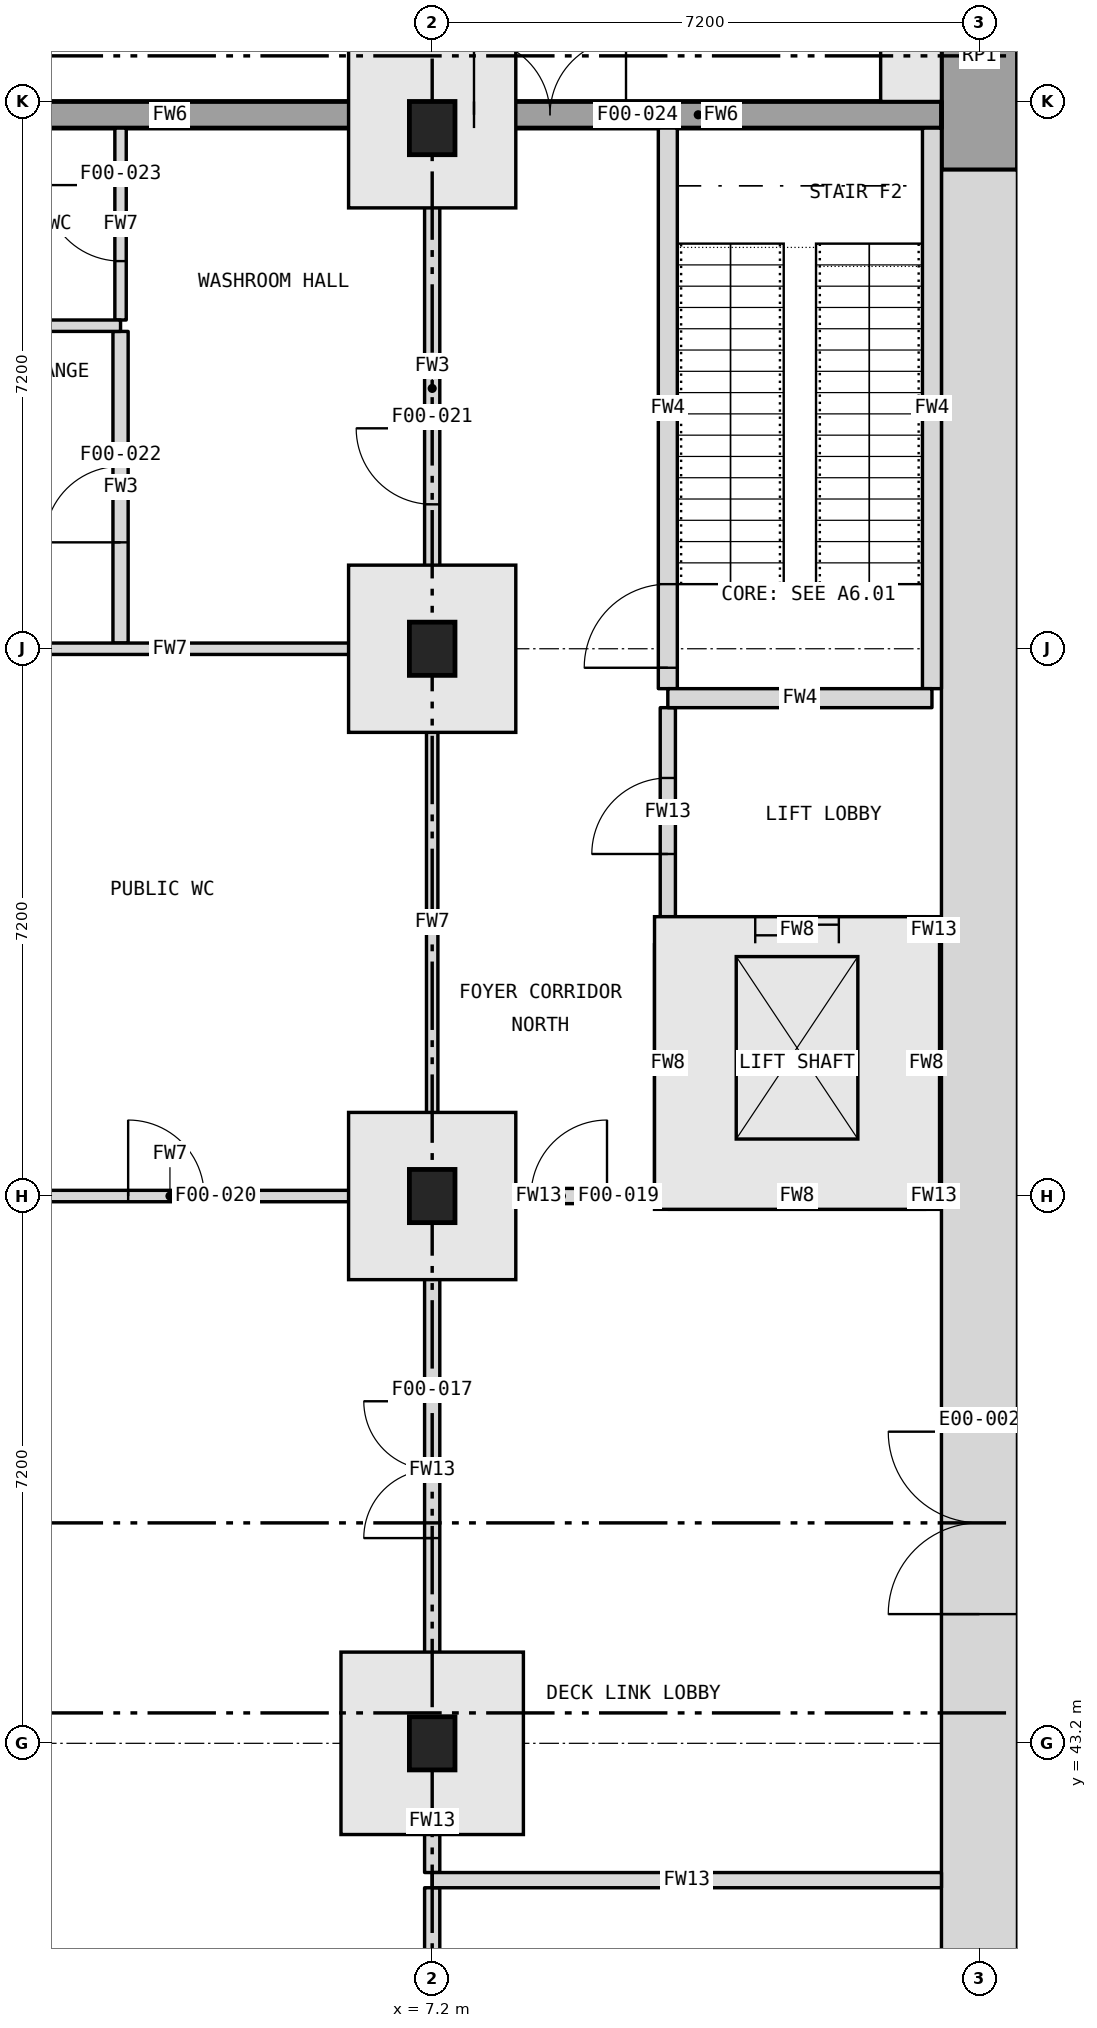
"""IFC4 building model, lengths in metres.
Left out: names, types, materials, properties, quantities, classifications, styles, units other than length and angle.
Written with IfcOpenShell. Run it as: python <this file> out.ifc"""

import sys

from ifc_helpers import new_model, si_unit, direction, frame, frame_2d, origin, origin_2d, place, context, subcontext, project, spatial, rectangle, extrude, element, fill, save


model = new_model("IFC4")
c1 = context("Model", 3, precision=1e-05, world=origin(), true_north=direction((0.0, 1.0)))
c2 = subcontext(c1, "Body", "Model", "MODEL_VIEW")
j1 = project(units=[si_unit("LENGTHUNIT", "METRE"), si_unit("PLANEANGLEUNIT", "RADIAN")], contexts=[c1])
p1 = place(None, origin())
s1 = spatial("IfcSite", under=j1, at=p1, CompositionType="ELEMENT")
p2 = place(p1, origin())
s2 = spatial("IfcBuilding", under=s1, at=p2, CompositionType="ELEMENT")
p3 = place(p2, origin())
s3 = spatial("IfcBuildingStorey", under=s2, at=p3, CompositionType="ELEMENT", Elevation=0.0)
p4 = place(p3, frame((13.6, 64.7, 0.0), z_axis=(0.0, 0.0, 1.0), x_axis=(0.0, 1.0, 0.0)))
e1 = element("IfcWall", 1, at=p4, inside=s3, PredefinedType="SOLIDWALL", context=c2, shape_type="SweptSolid", body=[
    extrude(rectangle(XDim=7.3, YDim=0.6, at=frame_2d((3.65, 0.0))), origin(), (0.0, 0.0, 1.0), 6.0),
])
p5 = place(p4, frame((4.6, 0.0, 0.0)))
e2 = element("IfcOpeningElement", 2, at=p5, cuts=e1, PredefinedType="OPENING", context=c2, shape_type="SweptSolid", body=[
    extrude(rectangle(XDim=1.8, YDim=2.4, at=frame_2d((0.9, 1.2))), frame((0.0, 0.31, 0.0), z_axis=(0.0, -1.0, 0.0), x_axis=(1.0, 0.0, 0.0)), (0.0, 0.0, 1.0), 0.62),
])
p6 = place(p3, frame((14.4, 63.9, 0.0), z_axis=(0.0, 0.0, 1.0), x_axis=(0.0, 1.0, 0.0)))
e3 = element("IfcWall", 3, at=p6, inside=s3, PredefinedType="SOLIDWALL", context=c2, shape_type="SweptSolid", body=[
    extrude(rectangle(XDim=3.0, YDim=1.0, at=frame_2d((1.5, 0.0))), origin(), (0.0, 0.0, 1.0), 6.0),
])
p7 = place(p3, frame((14.4, 14.0, 0.0), z_axis=(0.0, 0.0, 1.0), x_axis=(0.0, 1.0, 0.0)))
e4 = element("IfcWall", 4, at=p7, inside=s3, PredefinedType="SOLIDWALL", context=c2, shape_type="SweptSolid", body=[
    extrude(rectangle(XDim=49.9, YDim=1.0, at=frame_2d((24.95, 0.0))), origin(), (0.0, 0.0, 1.0), 6.0),
])
p8 = place(p7, frame((30.9, 0.0, 0.0)))
e5 = element("IfcOpeningElement", 5, at=p8, cuts=e4, PredefinedType="OPENING", context=c2, shape_type="SweptSolid", body=[
    extrude(rectangle(XDim=2.4, YDim=2.7, at=frame_2d((1.2, 1.35))), frame((0.0, 0.51, 0.0), z_axis=(0.0, -1.0, 0.0), x_axis=(1.0, 0.0, 0.0)), (0.0, 0.0, 1.0), 1.02),
])
for number, where, z_axis, x_axis in (
    (6, (7.2, 43.2, -0.405), (0.0, 0.0, 1.0), (1.0, 0.0, 0.0)),
    (7, (7.2, 50.4, -0.405), (0.0, 0.0, 1.0), (1.0, 0.0, 0.0)),
    (8, (7.2, 57.6, -0.405), (0.0, 0.0, 1.0), (1.0, 0.0, 0.0)),
):
    element("IfcColumn", number, at=place(p3, frame(where, z_axis=z_axis, x_axis=x_axis)), inside=s3, PredefinedType="COLUMN", context=c2, shape_type="SweptSolid", body=[
        extrude(rectangle(XDim=0.6, YDim=0.7, at=origin_2d()), origin(), (0.0, 0.0, 1.0), 6.405),
    ])
p9 = place(p3, frame((7.2, 64.45, -0.45), z_axis=(0.0, 0.0, 1.0), x_axis=(1.0, 0.0, 0.0)))
e9 = element("IfcColumn", 9, at=p9, inside=s3, PredefinedType="COLUMN", context=c2, shape_type="SweptSolid", body=[
    extrude(rectangle(XDim=0.6, YDim=0.7, at=origin_2d()), origin(), (0.0, 0.0, 1.0), 6.45),
])
p10 = place(p3, frame((0.6, 64.625, 0.0), z_axis=(0.0, 0.0, 1.0), x_axis=(1.0, 0.0, 0.0)))
e10 = element("IfcWall", 10, at=p10, inside=s3, PredefinedType="SOLIDWALL", context=c2, shape_type="SweptSolid", body=[
    extrude(rectangle(XDim=6.3, YDim=0.35, at=frame_2d((3.15, 0.0))), origin(), (0.0, 0.0, 1.0), 5.675),
])
p11 = place(p3, frame((7.5, 64.625, 0.0), z_axis=(0.0, 0.0, 1.0), x_axis=(1.0, 0.0, 0.0)))
e11 = element("IfcWall", 11, at=p11, inside=s3, PredefinedType="SOLIDWALL", context=c2, shape_type="SweptSolid", body=[
    extrude(rectangle(XDim=6.4, YDim=0.35, at=frame_2d((3.2, 0.0))), origin(), (0.0, 0.0, 1.0), 5.675),
])
p12 = place(p11, frame((0.25, 0.0, 0.0)))
e12 = element("IfcOpeningElement", 12, at=p12, cuts=e11, PredefinedType="OPENING", context=c2, shape_type="SweptSolid", body=[
    extrude(rectangle(XDim=2.0, YDim=2.4, at=frame_2d((1.0, 1.2))), frame((0.0, 0.185, 0.0), z_axis=(0.0, -1.0, 0.0), x_axis=(1.0, 0.0, 0.0)), (0.0, 0.0, 1.0), 0.37),
])
p13 = place(p3, frame((3.1, 61.925, 0.0), z_axis=(0.0, 0.0, 1.0), x_axis=(0.0, 1.0, 0.0)))
e13 = element("IfcWall", 13, at=p13, inside=s3, PredefinedType="PARTITIONING", context=c2, shape_type="SweptSolid", body=[
    extrude(rectangle(XDim=2.525, YDim=0.15, at=frame_2d((1.262, 0.0))), origin(), (0.0, 0.0, 1.0), 5.675),
])
p14 = place(p13, frame((0.775, 0.0, 0.0)))
e14 = element("IfcOpeningElement", 14, at=p14, cuts=e13, PredefinedType="OPENING", context=c2, shape_type="SweptSolid", body=[
    extrude(rectangle(XDim=1.0, YDim=2.1, at=frame_2d((0.5, 1.05))), frame((0.0, 0.085, 0.0), z_axis=(0.0, -1.0, 0.0), x_axis=(1.0, 0.0, 0.0)), (0.0, 0.0, 1.0), 0.17),
])
p15 = place(p3, frame((3.1, 57.675, 0.0), z_axis=(0.0, 0.0, 1.0), x_axis=(0.0, 1.0, 0.0)))
e15 = element("IfcWall", 15, at=p15, inside=s3, PredefinedType="PARTITIONING", context=c2, shape_type="SweptSolid", body=[
    extrude(rectangle(XDim=4.1, YDim=0.2, at=frame_2d((2.05, 0.0))), origin(), (0.0, 0.0, 1.0), 5.675),
])
p16 = place(p15, frame((1.325, 0.0, 0.0)))
e16 = element("IfcOpeningElement", 16, at=p16, cuts=e15, PredefinedType="OPENING", context=c2, shape_type="SweptSolid", body=[
    extrude(rectangle(XDim=1.0, YDim=2.1, at=frame_2d((0.5, 1.05))), frame((0.0, 0.11, 0.0), z_axis=(0.0, -1.0, 0.0), x_axis=(1.0, 0.0, 0.0)), (0.0, 0.0, 1.0), 0.22),
])
p17 = place(p3, frame((7.2, 41.5, 0.0), z_axis=(0.0, 0.0, 1.0), x_axis=(0.0, 1.0, 0.0)))
e17 = element("IfcWall", 17, at=p17, inside=s3, PredefinedType="PARTITIONING", context=c2, shape_type="SweptSolid", body=[
    extrude(rectangle(XDim=1.35, YDim=0.2, at=frame_2d((0.675, 0.0))), origin(), (0.0, 0.0, 1.0), 5.675),
])
p18 = place(p3, frame((7.2, 43.55, 0.0), z_axis=(0.0, 0.0, 1.0), x_axis=(0.0, 1.0, 0.0)))
e18 = element("IfcWall", 18, at=p18, inside=s3, PredefinedType="PARTITIONING", context=c2, shape_type="SweptSolid", body=[
    extrude(rectangle(XDim=6.5, YDim=0.2, at=frame_2d((3.25, 0.0))), origin(), (0.0, 0.0, 1.0), 5.675),
])
p19 = place(p18, frame((2.35, 0.0, 0.0)))
e19 = element("IfcOpeningElement", 19, at=p19, cuts=e18, PredefinedType="OPENING", context=c2, shape_type="SweptSolid", body=[
    extrude(rectangle(XDim=1.8, YDim=2.1, at=frame_2d((0.9, 1.05))), frame((0.0, 0.11, 0.0), z_axis=(0.0, -1.0, 0.0), x_axis=(1.0, 0.0, 0.0)), (0.0, 0.0, 1.0), 0.22),
])
p20 = place(p3, frame((7.2, 50.75, 0.0), z_axis=(0.0, 0.0, 1.0), x_axis=(0.0, 1.0, 0.0)))
e20 = element("IfcWall", 20, at=p20, inside=s3, PredefinedType="PARTITIONING", context=c2, shape_type="SweptSolid", body=[
    extrude(rectangle(XDim=6.5, YDim=0.15, at=frame_2d((3.25, 0.0))), origin(), (0.0, 0.0, 1.0), 5.675),
])
p21 = place(p3, frame((7.2, 36.35, 0.0), z_axis=(0.0, 0.0, 1.0), x_axis=(0.0, 1.0, 0.0)))
e21 = element("IfcWall", 21, at=p21, inside=s3, PredefinedType="PARTITIONING", context=c2, shape_type="SweptSolid", body=[
    extrude(rectangle(XDim=4.95, YDim=0.2, at=frame_2d((2.475, 0.0))), origin(), (0.0, 0.0, 1.0), 5.675),
])
p22 = place(p21, frame((1.55, 0.0, 0.0)))
e22 = element("IfcOpeningElement", 22, at=p22, cuts=e21, PredefinedType="OPENING", context=c2, shape_type="SweptSolid", body=[
    extrude(rectangle(XDim=1.8, YDim=2.1, at=frame_2d((0.9, 1.05))), frame((0.0, 0.11, 0.0), z_axis=(0.0, -1.0, 0.0), x_axis=(1.0, 0.0, 0.0)), (0.0, 0.0, 1.0), 0.22),
])
p23 = place(p3, frame((7.2, 57.95, 0.0), z_axis=(0.0, 0.0, 1.0), x_axis=(0.0, 1.0, 0.0)))
e23 = element("IfcWall", 23, at=p23, inside=s3, PredefinedType="PARTITIONING", context=c2, shape_type="SweptSolid", body=[
    extrude(rectangle(XDim=6.15, YDim=0.2, at=frame_2d((3.075, 0.0))), origin(), (0.0, 0.0, 1.0), 5.675),
])
p24 = place(p23, frame((1.55, 0.0, 0.0)))
e24 = element("IfcOpeningElement", 24, at=p24, cuts=e23, PredefinedType="OPENING", context=c2, shape_type="SweptSolid", body=[
    extrude(rectangle(XDim=1.0, YDim=2.1, at=frame_2d((0.5, 1.05))), frame((0.0, 0.11, 0.0), z_axis=(0.0, -1.0, 0.0), x_axis=(1.0, 0.0, 0.0)), (0.0, 0.0, 1.0), 0.22),
])
p25 = place(p3, frame((10.3, 57.075, 0.0), z_axis=(0.0, 0.0, 1.0), x_axis=(0.0, 1.0, 0.0)))
e25 = element("IfcWall", 25, at=p25, inside=s3, PredefinedType="SOLIDWALL", context=c2, shape_type="SweptSolid", body=[
    extrude(rectangle(XDim=7.375, YDim=0.25, at=frame_2d((3.688, 0.0))), origin(), (0.0, 0.0, 1.0), 5.675),
])
p26 = place(p25, frame((0.275, 0.0, 0.0)))
e26 = element("IfcOpeningElement", 26, at=p26, cuts=e25, PredefinedType="OPENING", context=c2, shape_type="SweptSolid", body=[
    extrude(rectangle(XDim=1.1, YDim=2.1, at=frame_2d((0.55, 1.05))), frame((0.0, 0.135, 0.0), z_axis=(0.0, -1.0, 0.0), x_axis=(1.0, 0.0, 0.0)), (0.0, 0.0, 1.0), 0.27),
])
p27 = place(p3, frame((10.3, 50.575, -1.2), z_axis=(0.0, 0.0, 1.0), x_axis=(0.0, 1.0, 0.0)))
e27 = element("IfcWall", 27, at=p27, inside=s3, PredefinedType="SOLIDWALL", context=c2, shape_type="SweptSolid", body=[
    extrude(rectangle(XDim=3.15, YDim=0.35, at=frame_2d((1.575, 0.0))), origin(), (0.0, 0.0, 1.0), 6.875),
])
p28 = place(p3, frame((10.3, 54.075, 0.0), z_axis=(0.0, 0.0, 1.0), x_axis=(0.0, 1.0, 0.0)))
e28 = element("IfcWall", 28, at=p28, inside=s3, PredefinedType="PARTITIONING", context=c2, shape_type="SweptSolid", body=[
    extrude(rectangle(XDim=2.75, YDim=0.2, at=frame_2d((1.375, 0.0))), origin(), (0.0, 0.0, 1.0), 5.675),
])
p29 = place(p28, frame((0.825, 0.0, 0.0)))
e29 = element("IfcOpeningElement", 29, at=p29, cuts=e28, PredefinedType="OPENING", context=c2, shape_type="SweptSolid", body=[
    extrude(rectangle(XDim=1.0, YDim=2.1, at=frame_2d((0.5, 1.05))), frame((0.0, 0.11, 0.0), z_axis=(0.0, -1.0, 0.0), x_axis=(1.0, 0.0, 0.0)), (0.0, 0.0, 1.0), 0.22),
])
p30 = place(p3, frame((13.7, 50.575, -1.2), z_axis=(0.0, 0.0, 1.0), x_axis=(0.0, 1.0, 0.0)))
e30 = element("IfcWall", 30, at=p30, inside=s3, PredefinedType="SOLIDWALL", context=c2, shape_type="SweptSolid", body=[
    extrude(rectangle(XDim=3.15, YDim=0.35, at=frame_2d((1.575, 0.0))), origin(), (0.0, 0.0, 1.0), 6.875),
])
p31 = place(p3, frame((13.775, 57.075, 0.0), z_axis=(0.0, 0.0, 1.0), x_axis=(0.0, 1.0, 0.0)))
e31 = element("IfcWall", 31, at=p31, inside=s3, PredefinedType="SOLIDWALL", context=c2, shape_type="SweptSolid", body=[
    extrude(rectangle(XDim=7.375, YDim=0.25, at=frame_2d((3.688, 0.0))), origin(), (0.0, 0.0, 1.0), 5.675),
])
p32 = place(p3, frame((7.2, 41.4, 0.0), z_axis=(0.0, 0.0, 1.0), x_axis=(1.0, 0.0, 0.0)))
e32 = element("IfcWall", 32, at=p32, inside=s3, PredefinedType="PARTITIONING", context=c2, shape_type="SweptSolid", body=[
    extrude(rectangle(XDim=6.7, YDim=0.2, at=frame_2d((3.35, 0.0))), origin(), (0.0, 0.0, 1.0), 5.675),
])
p33 = place(p3, frame((10.3, 50.4, -1.2), z_axis=(0.0, 0.0, 1.0), x_axis=(1.0, 0.0, 0.0)))
e33 = element("IfcWall", 33, at=p33, inside=s3, PredefinedType="SOLIDWALL", context=c2, shape_type="SweptSolid", body=[
    extrude(rectangle(XDim=3.4, YDim=0.35, at=frame_2d((1.7, 0.0))), origin(), (0.0, 0.0, 1.0), 6.875),
])
p34 = place(p3, frame((7.5, 50.4, 0.0), z_axis=(0.0, 0.0, 1.0), x_axis=(1.0, 0.0, 0.0)))
e34 = element("IfcWall", 34, at=p34, inside=s3, PredefinedType="PARTITIONING", context=c2, shape_type="SweptSolid", body=[
    extrude(rectangle(XDim=2.8, YDim=0.2, at=frame_2d((1.4, 0.0))), origin(), (0.0, 0.0, 1.0), 5.675),
])
p35 = place(p34, frame((1.0, 0.0, 0.0)))
e35 = element("IfcOpeningElement", 35, at=p35, cuts=e34, PredefinedType="OPENING", context=c2, shape_type="SweptSolid", body=[
    extrude(rectangle(XDim=1.0, YDim=2.1, at=frame_2d((0.5, 1.05))), frame((0.0, 0.11, 0.0), z_axis=(0.0, -1.0, 0.0), x_axis=(1.0, 0.0, 0.0)), (0.0, 0.0, 1.0), 0.22),
])
p36 = place(p3, frame((13.7, 50.4, 0.0), z_axis=(0.0, 0.0, 1.0), x_axis=(1.0, 0.0, 0.0)))
e36 = element("IfcWall", 36, at=p36, inside=s3, PredefinedType="PARTITIONING", context=c2, shape_type="SweptSolid", body=[
    extrude(rectangle(XDim=0.2, YDim=0.2, at=frame_2d((0.1, 0.0))), origin(), (0.0, 0.0, 1.0), 5.675),
])
p37 = place(p3, frame((0.6, 50.4, 0.0), z_axis=(0.0, 0.0, 1.0), x_axis=(1.0, 0.0, 0.0)))
e37 = element("IfcWall", 37, at=p37, inside=s3, PredefinedType="PARTITIONING", context=c2, shape_type="SweptSolid", body=[
    extrude(rectangle(XDim=6.3, YDim=0.15, at=frame_2d((3.15, 0.0))), origin(), (0.0, 0.0, 1.0), 5.675),
])
p38 = place(p37, frame((2.6, 0.0, 0.0)))
e38 = element("IfcOpeningElement", 38, at=p38, cuts=e37, PredefinedType="OPENING", context=c2, shape_type="SweptSolid", body=[
    extrude(rectangle(XDim=1.0, YDim=2.1, at=frame_2d((0.5, 1.05))), frame((0.0, 0.085, 0.0), z_axis=(0.0, -1.0, 0.0), x_axis=(1.0, 0.0, 0.0)), (0.0, 0.0, 1.0), 0.17),
])
p39 = place(p3, frame((10.3, 53.9, -1.2), z_axis=(0.0, 0.0, 1.0), x_axis=(1.0, 0.0, 0.0)))
e39 = element("IfcWall", 39, at=p39, inside=s3, PredefinedType="SOLIDWALL", context=c2, shape_type="SweptSolid", body=[
    extrude(rectangle(XDim=3.4, YDim=0.35, at=frame_2d((1.7, 0.0))), origin(), (0.0, 0.0, 1.0), 6.875),
])
p40 = place(p39, frame((1.15, 0.0, 1.2)))
e40 = element("IfcOpeningElement", 40, at=p40, cuts=e39, PredefinedType="OPENING", context=c2, shape_type="SweptSolid", body=[
    extrude(rectangle(XDim=1.1, YDim=2.1, at=frame_2d((0.55, 1.05))), frame((0.0, 0.185, 0.0), z_axis=(0.0, -1.0, 0.0), x_axis=(1.0, 0.0, 0.0)), (0.0, 0.0, 1.0), 0.37),
])
p41 = place(p3, frame((13.7, 53.9, 0.0), z_axis=(0.0, 0.0, 1.0), x_axis=(1.0, 0.0, 0.0)))
e41 = element("IfcWall", 41, at=p41, inside=s3, PredefinedType="PARTITIONING", context=c2, shape_type="SweptSolid", body=[
    extrude(rectangle(XDim=0.2, YDim=0.2, at=frame_2d((0.1, 0.0))), origin(), (0.0, 0.0, 1.0), 5.675),
])
p42 = place(p3, frame((10.3, 56.95, 0.0), z_axis=(0.0, 0.0, 1.0), x_axis=(1.0, 0.0, 0.0)))
e42 = element("IfcWall", 42, at=p42, inside=s3, PredefinedType="SOLIDWALL", context=c2, shape_type="SweptSolid", body=[
    extrude(rectangle(XDim=3.475, YDim=0.25, at=frame_2d((1.737, 0.0))), origin(), (0.0, 0.0, 1.0), 5.675),
])
p43 = place(p3, frame((0.6, 57.6, 0.0), z_axis=(0.0, 0.0, 1.0), x_axis=(1.0, 0.0, 0.0)))
e43 = element("IfcWall", 43, at=p43, inside=s3, PredefinedType="PARTITIONING", context=c2, shape_type="SweptSolid", body=[
    extrude(rectangle(XDim=6.3, YDim=0.15, at=frame_2d((3.15, 0.0))), origin(), (0.0, 0.0, 1.0), 5.675),
])
p44 = place(p3, frame((0.5, 61.85, 0.0), z_axis=(0.0, 0.0, 1.0), x_axis=(1.0, 0.0, 0.0)))
e44 = element("IfcWall", 44, at=p44, inside=s3, PredefinedType="PARTITIONING", context=c2, shape_type="SweptSolid", body=[
    extrude(rectangle(XDim=2.6, YDim=0.15, at=frame_2d((1.3, 0.0))), origin(), (0.0, 0.0, 1.0), 5.675),
])
p45 = place(p8, origin())
e45 = element("IfcDoor", 45, at=p45, inside=s3, OperationType="DOUBLE_DOOR_SINGLE_SWING", PredefinedType="DOOR", context=c2, shape_type="SweptSolid", body=[
    extrude(rectangle(XDim=2.4, YDim=2.7, at=frame_2d((1.2, 1.35))), frame((0.0, 0.025, 0.0), z_axis=(0.0, -1.0, 0.0), x_axis=(1.0, 0.0, 0.0)), (0.0, 0.0, 1.0), 0.05),
])
fill(e5, e45)
p46 = place(p26, origin())
e46 = element("IfcDoor", 46, at=p46, inside=s3, OperationType="SINGLE_SWING_LEFT", PredefinedType="DOOR", context=c2, shape_type="SweptSolid", body=[
    extrude(rectangle(XDim=1.1, YDim=2.1, at=frame_2d((0.55, 1.05))), frame((0.0, 0.025, 0.0), z_axis=(0.0, -1.0, 0.0), x_axis=(1.0, 0.0, 0.0)), (0.0, 0.0, 1.0), 0.05),
])
fill(e26, e46)
p47 = place(p29, origin())
e47 = element("IfcDoor", 47, at=p47, inside=s3, OperationType="SINGLE_SWING_LEFT", PredefinedType="DOOR", context=c2, shape_type="SweptSolid", body=[
    extrude(rectangle(XDim=1.0, YDim=2.1, at=frame_2d((0.5, 1.05))), frame((0.0, 0.025, 0.0), z_axis=(0.0, -1.0, 0.0), x_axis=(1.0, 0.0, 0.0)), (0.0, 0.0, 1.0), 0.05),
])
fill(e29, e47)
p48 = place(p40, origin())
e48 = element("IfcDoor", 48, at=p48, inside=s3, OperationType="DOUBLE_DOOR_SLIDING", PredefinedType="DOOR", context=c2, shape_type="SweptSolid", body=[
    extrude(rectangle(XDim=1.1, YDim=2.1, at=frame_2d((0.55, 1.05))), frame((0.0, 0.025, 0.0), z_axis=(0.0, -1.0, 0.0), x_axis=(1.0, 0.0, 0.0)), (0.0, 0.0, 1.0), 0.05),
])
fill(e40, e48)
p49 = place(p19, origin())
e49 = element("IfcDoor", 49, at=p49, inside=s3, OperationType="DOUBLE_DOOR_SINGLE_SWING", PredefinedType="DOOR", context=c2, shape_type="SweptSolid", body=[
    extrude(rectangle(XDim=1.8, YDim=2.1, at=frame_2d((0.9, 1.05))), frame((0.0, 0.025, 0.0), z_axis=(0.0, -1.0, 0.0), x_axis=(1.0, 0.0, 0.0)), (0.0, 0.0, 1.0), 0.05),
])
fill(e19, e49)
p50 = place(p35, origin())
e50 = element("IfcDoor", 50, at=p50, inside=s3, OperationType="SINGLE_SWING_RIGHT", PredefinedType="DOOR", context=c2, shape_type="SweptSolid", body=[
    extrude(rectangle(XDim=1.0, YDim=2.1, at=frame_2d((0.5, 1.05))), frame((0.0, 0.025, 0.0), z_axis=(0.0, -1.0, 0.0), x_axis=(1.0, 0.0, 0.0)), (0.0, 0.0, 1.0), 0.05),
])
fill(e35, e50)
p51 = place(p38, origin())
e51 = element("IfcDoor", 51, at=p51, inside=s3, OperationType="SINGLE_SWING_LEFT", PredefinedType="DOOR", context=c2, shape_type="SweptSolid", body=[
    extrude(rectangle(XDim=1.0, YDim=2.1, at=frame_2d((0.5, 1.05))), frame((0.0, 0.025, 0.0), z_axis=(0.0, -1.0, 0.0), x_axis=(1.0, 0.0, 0.0)), (0.0, 0.0, 1.0), 0.05),
])
fill(e38, e51)
p52 = place(p24, origin())
e52 = element("IfcDoor", 52, at=p52, inside=s3, OperationType="SINGLE_SWING_RIGHT", PredefinedType="DOOR", context=c2, shape_type="SweptSolid", body=[
    extrude(rectangle(XDim=1.0, YDim=2.1, at=frame_2d((0.5, 1.05))), frame((0.0, 0.025, 0.0), z_axis=(0.0, -1.0, 0.0), x_axis=(1.0, 0.0, 0.0)), (0.0, 0.0, 1.0), 0.05),
])
fill(e24, e52)
p53 = place(p16, origin())
e53 = element("IfcDoor", 53, at=p53, inside=s3, OperationType="SINGLE_SWING_LEFT", PredefinedType="DOOR", context=c2, shape_type="SweptSolid", body=[
    extrude(rectangle(XDim=1.0, YDim=2.1, at=frame_2d((0.5, 1.05))), frame((0.0, 0.025, 0.0), z_axis=(0.0, -1.0, 0.0), x_axis=(1.0, 0.0, 0.0)), (0.0, 0.0, 1.0), 0.05),
])
fill(e16, e53)
p54 = place(p14, origin())
e54 = element("IfcDoor", 54, at=p54, inside=s3, OperationType="SINGLE_SWING_RIGHT", PredefinedType="DOOR", context=c2, shape_type="SweptSolid", body=[
    extrude(rectangle(XDim=1.0, YDim=2.1, at=frame_2d((0.5, 1.05))), frame((0.0, 0.025, 0.0), z_axis=(0.0, -1.0, 0.0), x_axis=(1.0, 0.0, 0.0)), (0.0, 0.0, 1.0), 0.05),
])
fill(e14, e54)
p55 = place(p12, origin())
e55 = element("IfcDoor", 55, at=p55, inside=s3, OperationType="DOUBLE_DOOR_SINGLE_SWING", PredefinedType="DOOR", context=c2, shape_type="SweptSolid", body=[
    extrude(rectangle(XDim=2.0, YDim=2.4, at=frame_2d((1.0, 1.2))), frame((0.0, 0.025, 0.0), z_axis=(0.0, -1.0, 0.0), x_axis=(1.0, 0.0, 0.0)), (0.0, 0.0, 1.0), 0.05),
])
fill(e12, e55)
save(model, sys.argv[1])
